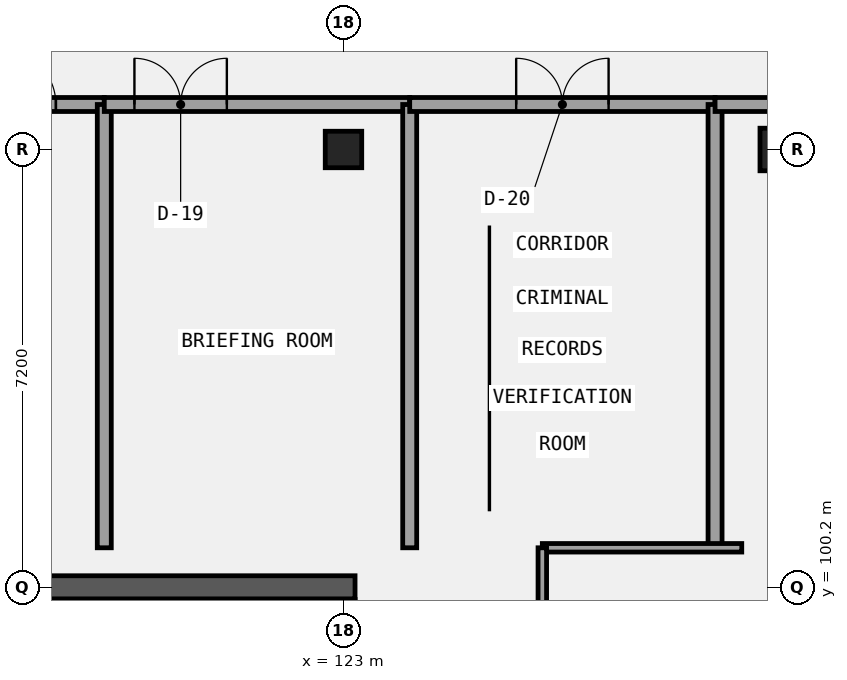
"""IFC4 building model, lengths in metres.
Left out: names, types, materials, properties, quantities, classifications, styles, units other than length and angle.
Written with IfcOpenShell. Run it as: python <this file> out.ifc"""

import sys

from ifc_helpers import new_model, si_unit, direction, frame, frame_2d, origin, origin_2d, place, context, subcontext, project, spatial, rectangle, extrude, element, fill, save


model = new_model("IFC4")
c1 = context("Model", 3, precision=1e-05, world=origin(), true_north=direction((0.0, 1.0)))
c2 = subcontext(c1, "Body", "Model", "MODEL_VIEW")
j1 = project(units=[si_unit("LENGTHUNIT", "METRE"), si_unit("PLANEANGLEUNIT", "RADIAN")], contexts=[c1])
p1 = place(None, origin())
s1 = spatial("IfcSite", under=j1, at=p1, CompositionType="ELEMENT")
p2 = place(p1, origin())
s2 = spatial("IfcBuilding", under=s1, at=p2, CompositionType="ELEMENT")
p3 = place(p2, frame((0.0, 0.0, 13.8)))
s3 = spatial("IfcBuildingStorey", under=s2, at=p3, CompositionType="ELEMENT", Elevation=13.8)
p4 = place(p3, frame((108.41, 100.2, 0.0), z_axis=(0.0, 0.0, 1.0), x_axis=(1.0, 0.0, 0.0)))
e1 = element("IfcWall", 1, at=p4, inside=s3, PredefinedType="SHEAR", context=c2, shape_type="SweptSolid", body=[
    extrude(rectangle(XDim=14.78, YDim=0.38, at=frame_2d((7.39, 0.0))), origin(), (0.0, 0.0, 1.0), 4.2),
])
p5 = place(p3, frame((123.0, 93.2, 0.0), z_axis=(0.0, 0.0, 1.0), x_axis=(0.0, 1.0, 0.0)))
e2 = element("IfcWall", 2, at=p5, inside=s3, PredefinedType="SHEAR", context=c2, shape_type="SweptSolid", body=[
    extrude(rectangle(XDim=6.8, YDim=0.38, at=frame_2d((3.4, 0.0))), origin(), (0.0, 0.0, 1.0), 4.2),
])
for number, where, z_axis, x_axis in (
    (3, (118.5, 96.82, 0.0), (0.0, 0.0, 1.0), (0.0, 1.0, 0.0)),
    (4, (120.42, 96.82, 0.0), (0.0, 0.0, 1.0), (0.0, 1.0, 0.0)),
    (5, (122.34, 96.82, 0.0), (0.0, 0.0, 1.0), (0.0, 1.0, 0.0)),
):
    element("IfcWall", number, at=place(p3, frame(where, z_axis=z_axis, x_axis=x_axis)), inside=s3, PredefinedType="SHEAR", context=c2, shape_type="SweptSolid", body=[
        extrude(rectangle(XDim=3.18, YDim=0.38, at=frame_2d((1.59, 0.0))), origin(), (0.0, 0.0, 1.0), 4.2),
    ])
p6 = place(p3, frame((123.0, 107.4, 0.0), z_axis=(0.0, 0.0, 1.0), x_axis=(1.0, 0.0, 0.0)))
e6 = element("IfcColumn", 6, at=p6, inside=s3, PredefinedType="COLUMN", context=c2, shape_type="SweptSolid", body=[
    extrude(rectangle(XDim=0.6, YDim=0.6, at=origin_2d()), origin(), (0.0, 0.0, 1.0), 4.2),
])
p7 = place(p3, frame((130.2, 107.4, 0.0), z_axis=(0.0, 0.0, 1.0), x_axis=(1.0, 0.0, 0.0)))
e7 = element("IfcColumn", 7, at=p7, inside=s3, PredefinedType="COLUMN", context=c2, shape_type="SweptSolid", body=[
    extrude(rectangle(XDim=0.7, YDim=0.7, at=origin_2d()), origin(), (0.0, 0.0, 1.0), 4.2),
])
p8 = place(p3, frame((114.043, 108.14, 0.0), z_axis=(0.0, 0.0, 1.0), x_axis=(1.0, 0.0, 0.0)))
e8 = element("IfcWall", 8, at=p8, inside=s3, PredefinedType="PARTITIONING", context=c2, shape_type="SweptSolid", body=[
    extrude(rectangle(XDim=5.023, YDim=0.23, at=frame_2d((2.511, 0.0))), origin(), (0.0, 0.0, 1.0), 3.94),
])
p9 = place(p8, frame((3.307, 0.0, 0.0)))
e9 = element("IfcOpeningElement", 9, at=p9, cuts=e8, PredefinedType="OPENING", context=c2, shape_type="SweptSolid", body=[
    extrude(rectangle(XDim=0.92, YDim=2.1, at=frame_2d((0.46, 1.05))), frame((0.0, 0.125, 0.0), z_axis=(0.0, -1.0, 0.0), x_axis=(1.0, 0.0, 0.0)), (0.0, 0.0, 1.0), 0.25),
])
p10 = place(p3, frame((119.066, 100.85, 0.0), z_axis=(0.0, 0.0, 1.0), x_axis=(0.0, 1.0, 0.0)))
e10 = element("IfcWall", 10, at=p10, inside=s3, PredefinedType="PARTITIONING", context=c2, shape_type="SweptSolid", body=[
    extrude(rectangle(XDim=7.29, YDim=0.23, at=frame_2d((3.645, 0.0))), origin(), (0.0, 0.0, 1.0), 3.94),
])
p11 = place(p3, frame((119.066, 108.14, 0.0), z_axis=(0.0, 0.0, 1.0), x_axis=(1.0, 0.0, 0.0)))
e11 = element("IfcWall", 11, at=p11, inside=s3, PredefinedType="PARTITIONING", context=c2, shape_type="SweptSolid", body=[
    extrude(rectangle(XDim=5.023, YDim=0.23, at=frame_2d((2.512, 0.0))), origin(), (0.0, 0.0, 1.0), 3.94),
])
p12 = place(p11, frame((0.496, 0.0, 0.0)))
e12 = element("IfcOpeningElement", 12, at=p12, cuts=e11, PredefinedType="OPENING", context=c2, shape_type="SweptSolid", body=[
    extrude(rectangle(XDim=1.52, YDim=2.1, at=frame_2d((0.76, 1.05))), frame((0.0, 0.125, 0.0), z_axis=(0.0, -1.0, 0.0), x_axis=(1.0, 0.0, 0.0)), (0.0, 0.0, 1.0), 0.25),
])
p13 = place(p3, frame((124.089, 100.85, 0.0), z_axis=(0.0, 0.0, 1.0), x_axis=(0.0, 1.0, 0.0)))
e13 = element("IfcWall", 13, at=p13, inside=s3, PredefinedType="PARTITIONING", context=c2, shape_type="SweptSolid", body=[
    extrude(rectangle(XDim=7.29, YDim=0.23, at=frame_2d((3.645, 0.0))), origin(), (0.0, 0.0, 1.0), 3.94),
])
p14 = place(p3, frame((124.089, 108.14, 0.0), z_axis=(0.0, 0.0, 1.0), x_axis=(1.0, 0.0, 0.0)))
e14 = element("IfcWall", 14, at=p14, inside=s3, PredefinedType="PARTITIONING", context=c2, shape_type="SweptSolid", body=[
    extrude(rectangle(XDim=5.022, YDim=0.23, at=frame_2d((2.511, 0.0))), origin(), (0.0, 0.0, 1.0), 3.94),
])
p15 = place(p14, frame((1.751, 0.0, 0.0)))
e15 = element("IfcOpeningElement", 15, at=p15, cuts=e14, PredefinedType="OPENING", context=c2, shape_type="SweptSolid", body=[
    extrude(rectangle(XDim=1.52, YDim=2.22, at=frame_2d((0.76, 1.11))), frame((0.0, 0.125, 0.0), z_axis=(0.0, -1.0, 0.0), x_axis=(1.0, 0.0, 0.0)), (0.0, 0.0, 1.0), 0.25),
])
p16 = place(p3, frame((129.111, 100.85, 0.0), z_axis=(0.0, 0.0, 1.0), x_axis=(0.0, 1.0, 0.0)))
e16 = element("IfcWall", 16, at=p16, inside=s3, PredefinedType="PARTITIONING", context=c2, shape_type="SweptSolid", body=[
    extrude(rectangle(XDim=7.29, YDim=0.23, at=frame_2d((3.645, 0.0))), origin(), (0.0, 0.0, 1.0), 3.94),
])
p17 = place(p3, frame((129.111, 108.14, 0.0), z_axis=(0.0, 0.0, 1.0), x_axis=(1.0, 0.0, 0.0)))
e17 = element("IfcWall", 17, at=p17, inside=s3, PredefinedType="PARTITIONING", context=c2, shape_type="SweptSolid", body=[
    extrude(rectangle(XDim=5.023, YDim=0.23, at=frame_2d((2.511, 0.0))), origin(), (0.0, 0.0, 1.0), 3.94),
])
p18 = place(p17, frame((3.007, 0.0, 0.0)))
e18 = element("IfcOpeningElement", 18, at=p18, cuts=e17, PredefinedType="OPENING", context=c2, shape_type="SweptSolid", body=[
    extrude(rectangle(XDim=1.52, YDim=2.35, at=frame_2d((0.76, 1.175))), frame((0.0, 0.125, 0.0), z_axis=(0.0, -1.0, 0.0), x_axis=(1.0, 0.0, 0.0)), (0.0, 0.0, 1.0), 0.25),
])
p19 = place(p3, frame((126.27, 100.85, 0.0), z_axis=(0.0, 0.0, 1.0), x_axis=(1.0, 0.0, 0.0)))
e19 = element("IfcWall", 19, at=p19, inside=s3, PredefinedType="PARTITIONING", context=c2, shape_type="SweptSolid", body=[
    extrude(rectangle(XDim=3.28, YDim=0.14, at=frame_2d((1.64, 0.0))), origin(), (0.0, 0.0, 1.0), 3.94),
])
p20 = place(p3, frame((126.27, 95.425, 0.0), z_axis=(0.0, 0.0, 1.0), x_axis=(0.0, 1.0, 0.0)))
e20 = element("IfcWall", 20, at=p20, inside=s3, PredefinedType="PARTITIONING", context=c2, shape_type="SweptSolid", body=[
    extrude(rectangle(XDim=5.425, YDim=0.14, at=frame_2d((2.712, 0.0))), origin(), (0.0, 0.0, 1.0), 3.94),
])
p21 = place(p20, frame((2.163, 0.0, 0.0)))
e21 = element("IfcOpeningElement", 21, at=p21, cuts=e20, PredefinedType="OPENING", context=c2, shape_type="SweptSolid", body=[
    extrude(rectangle(XDim=1.1, YDim=2.22, at=frame_2d((0.55, 1.11))), frame((0.0, 0.08, 0.0), z_axis=(0.0, -1.0, 0.0), x_axis=(1.0, 0.0, 0.0)), (0.0, 0.0, 1.0), 0.16),
])
p22 = place(p9, frame((0.92, 0.0, 0.0), z_axis=(0.0, 0.0, 1.0), x_axis=(-1.0, 0.0, 0.0)))
e22 = element("IfcDoor", 22, at=p22, inside=s3, OperationType="SINGLE_SWING_LEFT", PredefinedType="DOOR", context=c2, shape_type="SweptSolid", body=[
    extrude(rectangle(XDim=0.92, YDim=2.1, at=frame_2d((0.46, 1.05))), frame((0.0, 0.025, 0.0), z_axis=(0.0, -1.0, 0.0), x_axis=(1.0, 0.0, 0.0)), (0.0, 0.0, 1.0), 0.05),
])
fill(e9, e22)
p23 = place(p12, frame((1.52, 0.0, 0.0), z_axis=(0.0, 0.0, 1.0), x_axis=(-1.0, 0.0, 0.0)))
e23 = element("IfcDoor", 23, at=p23, inside=s3, OperationType="DOUBLE_DOOR_SINGLE_SWING", PredefinedType="DOOR", context=c2, shape_type="SweptSolid", body=[
    extrude(rectangle(XDim=1.52, YDim=2.1, at=frame_2d((0.76, 1.05))), frame((0.0, 0.025, 0.0), z_axis=(0.0, -1.0, 0.0), x_axis=(1.0, 0.0, 0.0)), (0.0, 0.0, 1.0), 0.05),
])
fill(e12, e23)
p24 = place(p15, frame((1.52, 0.0, 0.0), z_axis=(0.0, 0.0, 1.0), x_axis=(-1.0, 0.0, 0.0)))
e24 = element("IfcDoor", 24, at=p24, inside=s3, OperationType="DOUBLE_DOOR_SINGLE_SWING", PredefinedType="DOOR", context=c2, shape_type="SweptSolid", body=[
    extrude(rectangle(XDim=1.52, YDim=2.22, at=frame_2d((0.76, 1.11))), frame((0.0, 0.025, 0.0), z_axis=(0.0, -1.0, 0.0), x_axis=(1.0, 0.0, 0.0)), (0.0, 0.0, 1.0), 0.05),
])
fill(e15, e24)
save(model, sys.argv[1])
